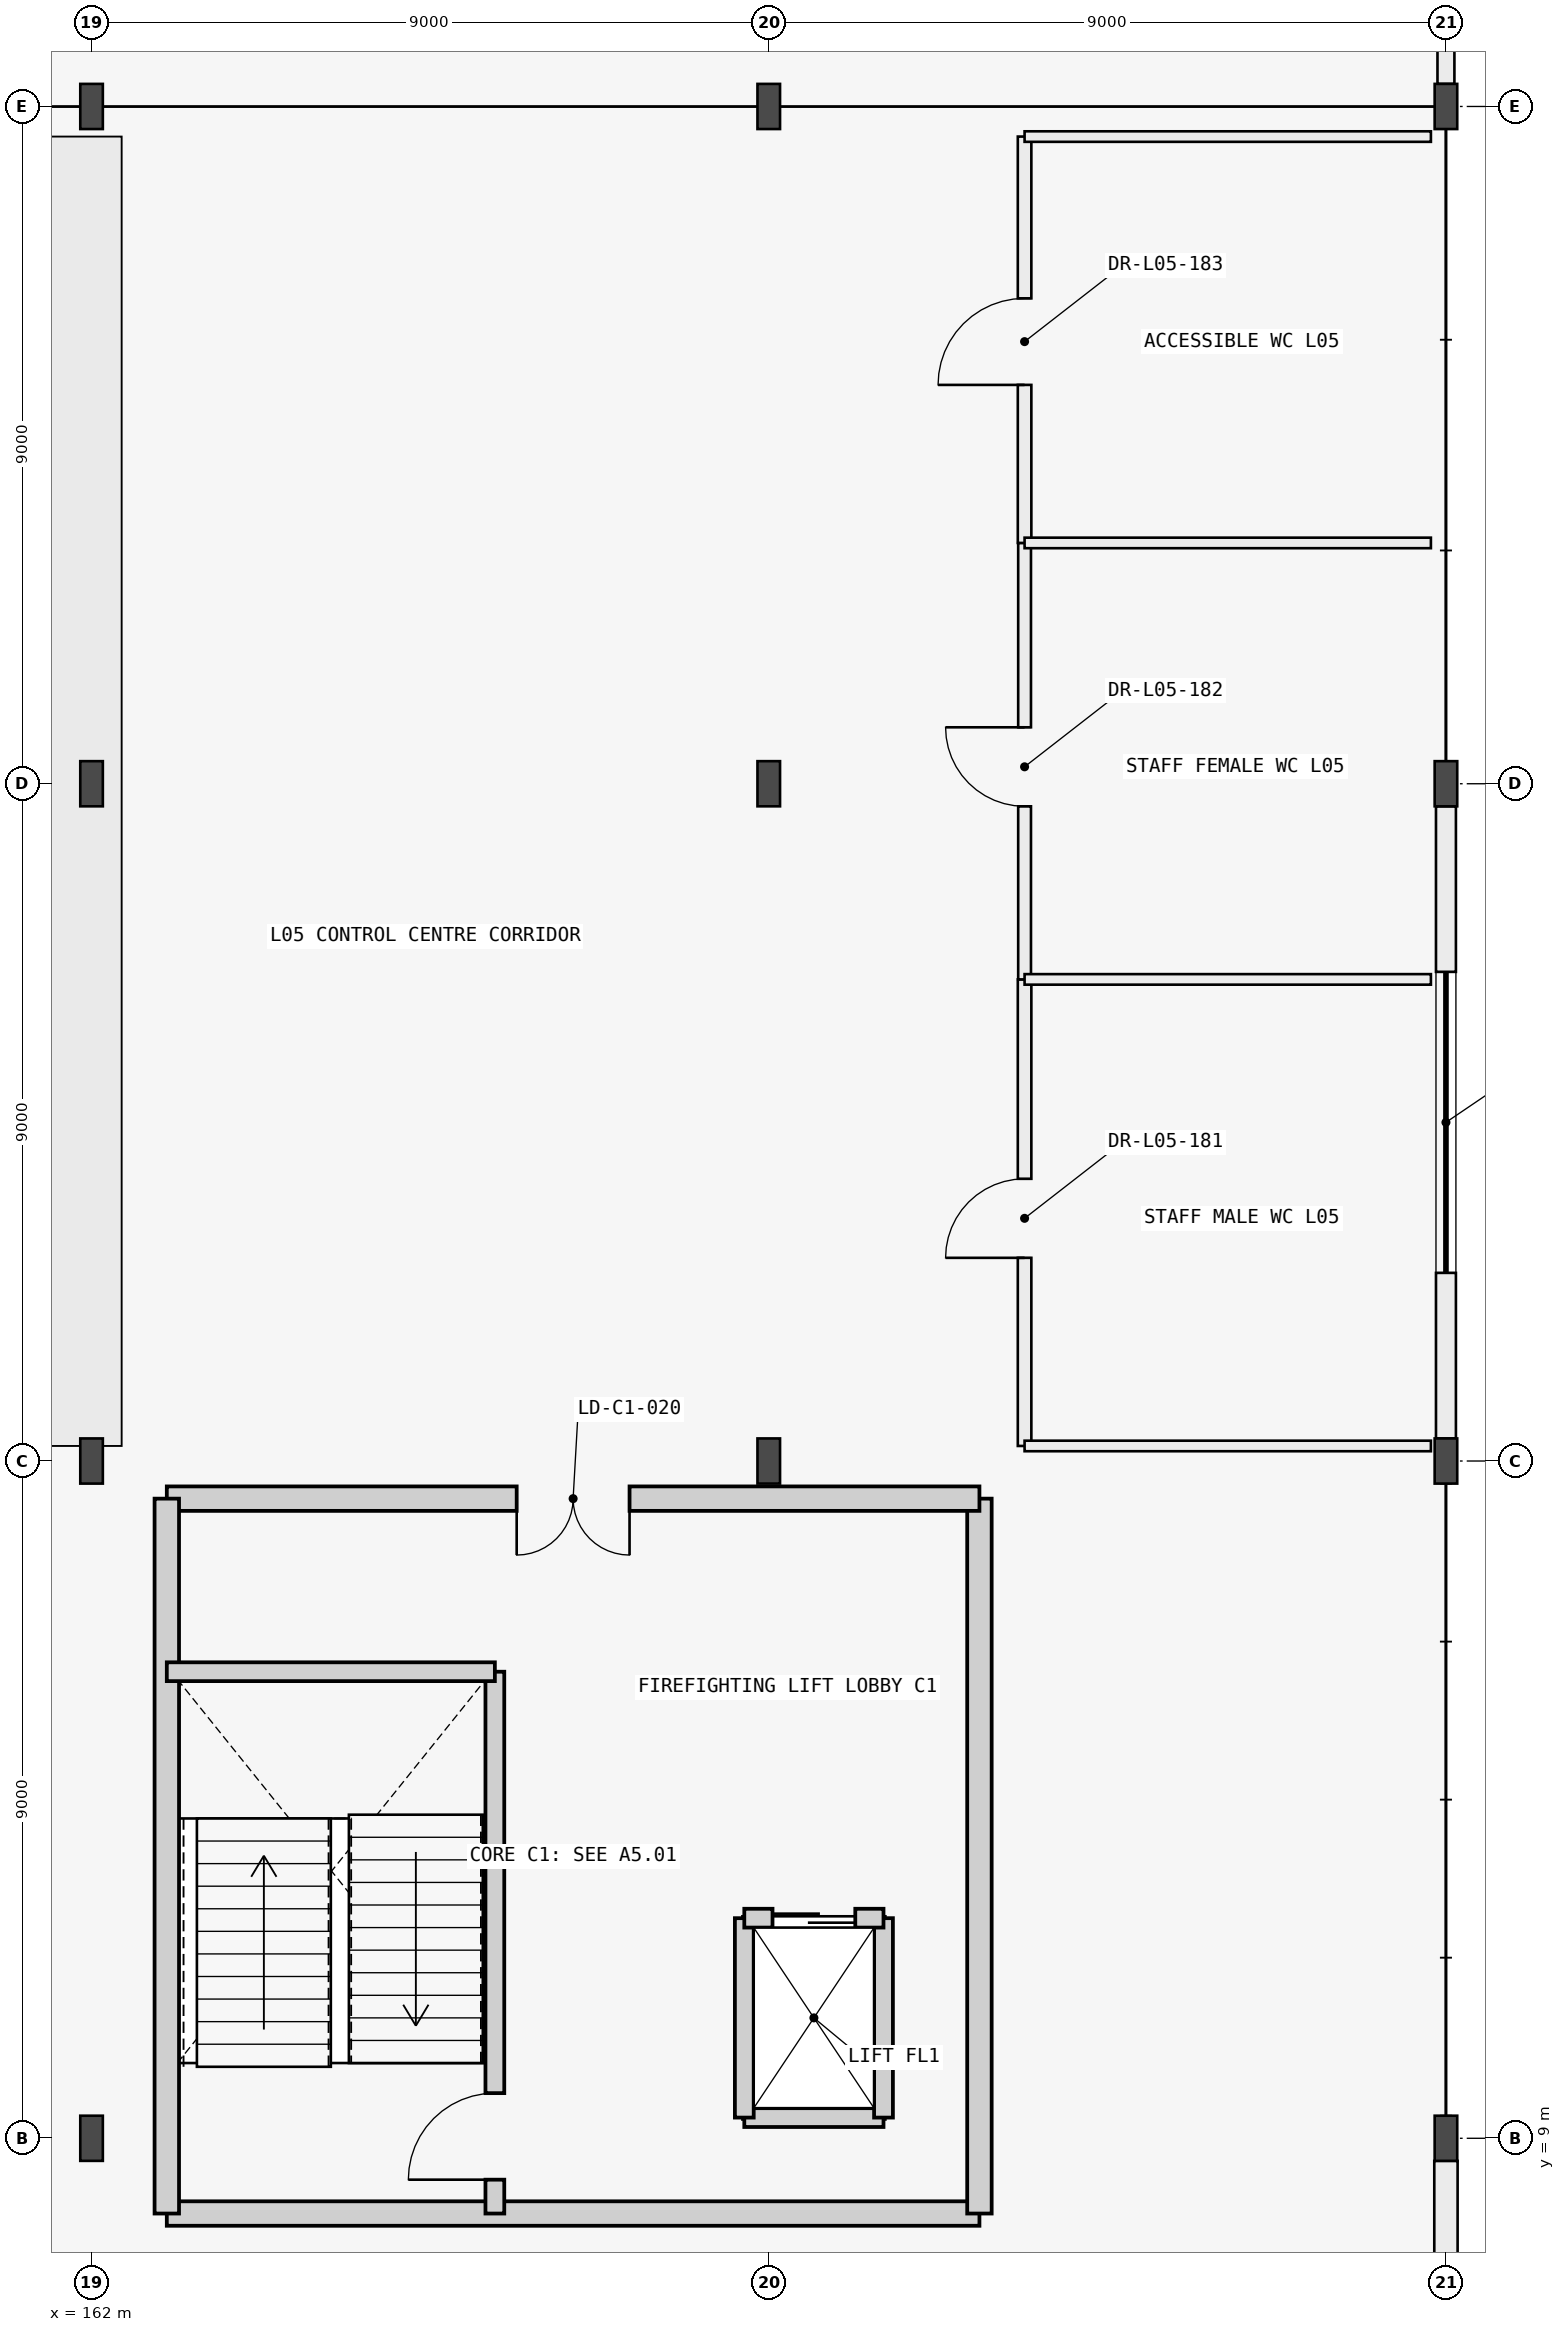
"""IFC4 building model, lengths in metres.
Left out: names, types, materials, properties, quantities, classifications, styles, units other than length and angle.
Written with IfcOpenShell. Run it as: python <this file> out.ifc"""

import sys

from ifc_helpers import new_model, si_unit, direction, frame, frame_2d, origin, origin_2d, place, context, subcontext, project, spatial, rectangle, i_section, extrude, element, fill, save


model = new_model("IFC4")
c1 = context("Model", 3, precision=1e-05, world=origin(), true_north=direction((0.0, 1.0)))
c2 = subcontext(c1, "Body", "Model", "MODEL_VIEW")
j1 = project(units=[si_unit("LENGTHUNIT", "METRE"), si_unit("PLANEANGLEUNIT", "RADIAN")], contexts=[c1])
p1 = place(None, origin())
s1 = spatial("IfcSite", under=j1, at=p1, CompositionType="ELEMENT")
p2 = place(p1, origin())
s2 = spatial("IfcBuilding", under=s1, at=p2, CompositionType="ELEMENT")
p3 = place(p2, frame((0.0, 0.0, 21.0)))
s3 = spatial("IfcBuildingStorey", under=s2, at=p3, CompositionType="ELEMENT", Elevation=21.0)
for number, where, z_axis, x_axis in (
    (1, (162.0, 9.0, 0.0), (0.0, 0.0, 1.0), (1.0, 0.0, 0.0)),
    (2, (180.0, 9.0, 0.0), (0.0, 0.0, 1.0), (1.0, 0.0, 0.0)),
    (3, (162.0, 18.0, 0.0), (0.0, 0.0, 1.0), (1.0, 0.0, 0.0)),
    (4, (171.0, 18.0, 0.0), (0.0, 0.0, 1.0), (1.0, 0.0, 0.0)),
    (5, (180.0, 18.0, 0.0), (0.0, 0.0, 1.0), (1.0, 0.0, 0.0)),
    (6, (162.0, 27.0, 0.0), (0.0, 0.0, 1.0), (1.0, 0.0, 0.0)),
    (7, (171.0, 27.0, 0.0), (0.0, 0.0, 1.0), (1.0, 0.0, 0.0)),
    (8, (180.0, 27.0, 0.0), (0.0, 0.0, 1.0), (1.0, 0.0, 0.0)),
    (9, (162.0, 36.0, 0.0), (0.0, 0.0, 1.0), (1.0, 0.0, 0.0)),
    (10, (171.0, 36.0, 0.0), (0.0, 0.0, 1.0), (1.0, 0.0, 0.0)),
    (11, (180.0, 36.0, 0.0), (0.0, 0.0, 1.0), (1.0, 0.0, 0.0)),
):
    element("IfcColumn", number, at=place(p3, frame(where, z_axis=z_axis, x_axis=x_axis)), inside=s3, PredefinedType="COLUMN", context=c2, shape_type="SweptSolid", body=[
        extrude(i_section(OverallWidth=0.3, OverallDepth=0.6, WebThickness=0.015, FlangeThickness=0.03, FilletRadius=0.027, at=origin_2d()), origin(), (0.0, 0.0, 1.0), 4.2),
    ])
p4 = place(p3, frame((180.0, 0.3, 0.0), z_axis=(0.0, 0.0, 1.0), x_axis=(0.0, 1.0, 0.0)))
e12 = element("IfcWall", 12, at=p4, inside=s3, PredefinedType="STANDARD", context=c2, shape_type="SweptSolid", body=[
    extrude(rectangle(XDim=8.4, YDim=0.31, at=frame_2d((4.2, 0.0))), origin(), (0.0, 0.0, 1.0), 3.635),
])
p5 = place(p4, frame((2.4, 0.0, 0.95)))
e13 = element("IfcOpeningElement", 13, at=p5, cuts=e12, PredefinedType="OPENING", context=c2, shape_type="SweptSolid", body=[
    extrude(rectangle(XDim=3.6, YDim=1.65, at=frame_2d((1.8, 0.825))), frame((0.0, 0.165, 0.0), z_axis=(0.0, -1.0, 0.0), x_axis=(1.0, 0.0, 0.0)), (0.0, 0.0, 1.0), 0.33),
])
p6 = place(p3, frame((180.0, 18.3, 0.0), z_axis=(0.0, 0.0, 1.0), x_axis=(0.0, 1.0, 0.0)))
e14 = element("IfcWall", 14, at=p6, inside=s3, PredefinedType="STANDARD", context=c2, shape_type="SweptSolid", body=[
    extrude(rectangle(XDim=8.4, YDim=0.265, at=frame_2d((4.2, 0.0))), origin(), (0.0, 0.0, 1.0), 3.635),
])
p7 = place(p6, frame((2.2, 0.0, 0.95)))
e15 = element("IfcOpeningElement", 15, at=p7, cuts=e14, PredefinedType="OPENING", context=c2, shape_type="SweptSolid", body=[
    extrude(rectangle(XDim=4.0, YDim=1.5, at=frame_2d((2.0, 0.75))), frame((0.0, 0.143, 0.0), z_axis=(0.0, -1.0, 0.0), x_axis=(1.0, 0.0, 0.0)), (0.0, 0.0, 1.0), 0.285),
])
p8 = place(p3, frame((180.0, 36.3, 0.0), z_axis=(0.0, 0.0, 1.0), x_axis=(0.0, 1.0, 0.0)))
e16 = element("IfcWall", 16, at=p8, inside=s3, PredefinedType="STANDARD", context=c2, shape_type="SweptSolid", body=[
    extrude(rectangle(XDim=8.4, YDim=0.225, at=frame_2d((4.2, 0.0))), origin(), (0.0, 0.0, 1.0), 3.635),
])
p9 = place(p8, frame((3.35, 0.0, 0.95)))
e17 = element("IfcOpeningElement", 17, at=p9, cuts=e16, PredefinedType="OPENING", context=c2, shape_type="SweptSolid", body=[
    extrude(rectangle(XDim=1.7, YDim=2.1, at=frame_2d((0.85, 1.05))), frame((0.0, 0.123, 0.0), z_axis=(0.0, -1.0, 0.0), x_axis=(1.0, 0.0, 0.0)), (0.0, 0.0, 1.0), 0.245),
])
p10 = place(p3, frame((163.0, 8.0, 0.0), z_axis=(0.0, 0.0, 1.0), x_axis=(1.0, 0.0, 0.0)))
e18 = element("IfcWall", 18, at=p10, inside=s3, PredefinedType="SHEAR", context=c2, shape_type="SweptSolid", body=[
    extrude(rectangle(XDim=10.8, YDim=0.325, at=frame_2d((5.4, 0.0))), origin(), (0.0, 0.0, 1.0), 3.96),
])
p11 = place(p3, frame((173.8, 8.0, 0.0), z_axis=(0.0, 0.0, 1.0), x_axis=(0.0, 1.0, 0.0)))
e19 = element("IfcWall", 19, at=p11, inside=s3, PredefinedType="SHEAR", context=c2, shape_type="SweptSolid", body=[
    extrude(rectangle(XDim=9.5, YDim=0.325, at=frame_2d((4.75, 0.0))), origin(), (0.0, 0.0, 1.0), 3.96),
])
p12 = place(p3, frame((173.8, 17.5, 0.0), z_axis=(0.0, 0.0, 1.0), x_axis=(-1.0, 0.0, 0.0)))
e20 = element("IfcWall", 20, at=p12, inside=s3, PredefinedType="SHEAR", context=c2, shape_type="SweptSolid", body=[
    extrude(rectangle(XDim=10.8, YDim=0.325, at=frame_2d((5.4, 0.0))), origin(), (0.0, 0.0, 1.0), 3.96),
])
p13 = place(p12, frame((4.65, 0.0, 0.0)))
e21 = element("IfcOpeningElement", 21, at=p13, cuts=e20, PredefinedType="OPENING", context=c2, shape_type="SweptSolid", body=[
    extrude(rectangle(XDim=1.5, YDim=2.2, at=frame_2d((0.75, 1.1))), frame((0.0, 0.172, 0.0), z_axis=(0.0, -1.0, 0.0), x_axis=(1.0, 0.0, 0.0)), (0.0, 0.0, 1.0), 0.345),
])
p14 = place(p3, frame((163.0, 17.5, 0.0), z_axis=(0.0, 0.0, 1.0), x_axis=(0.0, -1.0, 0.0)))
e22 = element("IfcWall", 22, at=p14, inside=s3, PredefinedType="SHEAR", context=c2, shape_type="SweptSolid", body=[
    extrude(rectangle(XDim=9.5, YDim=0.325, at=frame_2d((4.75, 0.0))), origin(), (0.0, 0.0, 1.0), 3.96),
])
p15 = place(p3, frame((167.36, 8.0, 0.0), z_axis=(0.0, 0.0, 1.0), x_axis=(0.0, 1.0, 0.0)))
e23 = element("IfcWall", 23, at=p15, inside=s3, PredefinedType="SHEAR", context=c2, shape_type="SweptSolid", body=[
    extrude(rectangle(XDim=7.2, YDim=0.25, at=frame_2d((3.6, 0.0))), origin(), (0.0, 0.0, 1.0), 3.96),
])
p16 = place(p15, frame((0.45, 0.0, 0.0)))
e24 = element("IfcOpeningElement", 24, at=p16, cuts=e23, PredefinedType="OPENING", context=c2, shape_type="SweptSolid", body=[
    extrude(rectangle(XDim=1.15, YDim=2.15, at=frame_2d((0.575, 1.075))), frame((0.0, 0.135, 0.0), z_axis=(0.0, -1.0, 0.0), x_axis=(1.0, 0.0, 0.0)), (0.0, 0.0, 1.0), 0.27),
])
p17 = place(p3, frame((163.0, 15.2, 0.0), z_axis=(0.0, 0.0, 1.0), x_axis=(1.0, 0.0, 0.0)))
e25 = element("IfcWall", 25, at=p17, inside=s3, PredefinedType="SHEAR", context=c2, shape_type="SweptSolid", body=[
    extrude(rectangle(XDim=4.36, YDim=0.25, at=frame_2d((2.18, 0.0))), origin(), (0.0, 0.0, 1.0), 3.96),
])
p18 = place(p3, frame((170.675, 9.275, 0.0), z_axis=(0.0, 0.0, 1.0), x_axis=(1.0, 0.0, 0.0)))
e26 = element("IfcWall", 26, at=p18, inside=s3, PredefinedType="SHEAR", context=c2, shape_type="SweptSolid", body=[
    extrude(rectangle(XDim=1.85, YDim=0.25, at=frame_2d((0.925, 0.0))), origin(), (0.0, 0.0, 1.0), 3.96),
])
for number, where, z_axis, x_axis in (
    (27, (170.675, 9.275, 0.0), (0.0, 0.0, 1.0), (0.0, 1.0, 0.0)),
    (28, (172.525, 9.275, 0.0), (0.0, 0.0, 1.0), (0.0, 1.0, 0.0)),
):
    element("IfcWall", number, at=place(p3, frame(where, z_axis=z_axis, x_axis=x_axis)), inside=s3, PredefinedType="SHEAR", context=c2, shape_type="SweptSolid", body=[
        extrude(rectangle(XDim=2.65, YDim=0.25, at=frame_2d((1.325, 0.0))), origin(), (0.0, 0.0, 1.0), 3.96),
    ])
p19 = place(p3, frame((170.675, 11.925, 0.0), z_axis=(0.0, 0.0, 1.0), x_axis=(1.0, 0.0, 0.0)))
e29 = element("IfcWall", 29, at=p19, inside=s3, PredefinedType="SHEAR", context=c2, shape_type="SweptSolid", body=[
    extrude(rectangle(XDim=1.85, YDim=0.25, at=frame_2d((0.925, 0.0))), origin(), (0.0, 0.0, 1.0), 3.96),
])
p20 = place(p19, frame((0.375, 0.0, 0.0)))
e30 = element("IfcOpeningElement", 30, at=p20, cuts=e29, PredefinedType="OPENING", context=c2, shape_type="SweptSolid", body=[
    extrude(rectangle(XDim=1.1, YDim=2.15, at=frame_2d((0.55, 1.075))), frame((0.0, 0.135, 0.0), z_axis=(0.0, -1.0, 0.0), x_axis=(1.0, 0.0, 0.0)), (0.0, 0.0, 1.0), 0.27),
])
p21 = place(p3, frame((174.4, 18.2, 0.0), z_axis=(0.0, 0.0, 1.0), x_axis=(0.0, 1.0, 0.0)))
e31 = element("IfcWall", 31, at=p21, inside=s3, PredefinedType="PARTITIONING", context=c2, shape_type="SweptSolid", body=[
    extrude(rectangle(XDim=6.2, YDim=0.18, at=frame_2d((3.1, 0.0))), origin(), (0.0, 0.0, 1.0), 3.635),
])
p22 = place(p21, frame((2.5, 0.0, 0.0)))
e32 = element("IfcOpeningElement", 32, at=p22, cuts=e31, PredefinedType="OPENING", context=c2, shape_type="SweptSolid", body=[
    extrude(rectangle(XDim=1.05, YDim=2.1, at=frame_2d((0.525, 1.05))), frame((0.0, 0.1, 0.0), z_axis=(0.0, -1.0, 0.0), x_axis=(1.0, 0.0, 0.0)), (0.0, 0.0, 1.0), 0.2),
])
p23 = place(p3, frame((174.4, 24.4, 0.0), z_axis=(0.0, 0.0, 1.0), x_axis=(0.0, 1.0, 0.0)))
e33 = element("IfcWall", 33, at=p23, inside=s3, PredefinedType="PARTITIONING", context=c2, shape_type="SweptSolid", body=[
    extrude(rectangle(XDim=5.8, YDim=0.17, at=frame_2d((2.9, 0.0))), origin(), (0.0, 0.0, 1.0), 3.635),
])
p24 = place(p23, frame((2.3, 0.0, 0.0)))
e34 = element("IfcOpeningElement", 34, at=p24, cuts=e33, PredefinedType="OPENING", context=c2, shape_type="SweptSolid", body=[
    extrude(rectangle(XDim=1.05, YDim=2.1, at=frame_2d((0.525, 1.05))), frame((0.0, 0.095, 0.0), z_axis=(0.0, -1.0, 0.0), x_axis=(1.0, 0.0, 0.0)), (0.0, 0.0, 1.0), 0.19),
])
p25 = place(p3, frame((174.4, 30.2, 0.0), z_axis=(0.0, 0.0, 1.0), x_axis=(0.0, 1.0, 0.0)))
e35 = element("IfcWall", 35, at=p25, inside=s3, PredefinedType="PARTITIONING", context=c2, shape_type="SweptSolid", body=[
    extrude(rectangle(XDim=5.4, YDim=0.18, at=frame_2d((2.7, 0.0))), origin(), (0.0, 0.0, 1.0), 3.635),
])
p26 = place(p25, frame((2.1, 0.0, 0.0)))
e36 = element("IfcOpeningElement", 36, at=p26, cuts=e35, PredefinedType="OPENING", context=c2, shape_type="SweptSolid", body=[
    extrude(rectangle(XDim=1.15, YDim=2.15, at=frame_2d((0.575, 1.075))), frame((0.0, 0.1, 0.0), z_axis=(0.0, -1.0, 0.0), x_axis=(1.0, 0.0, 0.0)), (0.0, 0.0, 1.0), 0.2),
])
p27 = place(p3, frame((174.4, 18.2, 0.0), z_axis=(0.0, 0.0, 1.0), x_axis=(1.0, 0.0, 0.0)))
e37 = element("IfcWall", 37, at=p27, inside=s3, PredefinedType="PARTITIONING", context=c2, shape_type="SweptSolid", body=[
    extrude(rectangle(XDim=5.4, YDim=0.14, at=frame_2d((2.7, 0.0))), origin(), (0.0, 0.0, 1.0), 3.435),
])
for number, where, z_axis, x_axis in (
    (38, (174.4, 24.4, 0.0), (0.0, 0.0, 1.0), (1.0, 0.0, 0.0)),
    (39, (174.4, 30.2, 0.0), (0.0, 0.0, 1.0), (1.0, 0.0, 0.0)),
):
    element("IfcWall", number, at=place(p3, frame(where, z_axis=z_axis, x_axis=x_axis)), inside=s3, PredefinedType="PARTITIONING", context=c2, shape_type="SweptSolid", body=[
        extrude(rectangle(XDim=5.4, YDim=0.14, at=frame_2d((2.7, 0.0))), origin(), (0.0, 0.0, 1.0), 3.96),
    ])
p28 = place(p3, frame((174.4, 35.6, 0.0), z_axis=(0.0, 0.0, 1.0), x_axis=(1.0, 0.0, 0.0)))
e40 = element("IfcWall", 40, at=p28, inside=s3, PredefinedType="PARTITIONING", context=c2, shape_type="SweptSolid", body=[
    extrude(rectangle(XDim=5.4, YDim=0.14, at=frame_2d((2.7, 0.0))), origin(), (0.0, 0.0, 1.0), 3.435),
])
p29 = place(p7, origin())
e41 = element("IfcWindow", 41, at=p29, inside=s3, PartitioningType="SINGLE_PANEL", PredefinedType="WINDOW", context=c2, shape_type="SweptSolid", body=[
    extrude(rectangle(XDim=4.0, YDim=1.5, at=frame_2d((2.0, 0.75))), frame((0.0, 0.03, 0.0), z_axis=(0.0, -1.0, 0.0), x_axis=(1.0, 0.0, 0.0)), (0.0, 0.0, 1.0), 0.06),
])
fill(e15, e41)
p30 = place(p16, origin())
e42 = element("IfcDoor", 42, at=p30, inside=s3, OperationType="SINGLE_SWING_LEFT", PredefinedType="DOOR", context=c2, shape_type="SweptSolid", body=[
    extrude(rectangle(XDim=1.15, YDim=2.15, at=frame_2d((0.575, 1.075))), frame((0.0, 0.025, 0.0), z_axis=(0.0, -1.0, 0.0), x_axis=(1.0, 0.0, 0.0)), (0.0, 0.0, 1.0), 0.05),
])
fill(e24, e42)
p31 = place(p13, origin())
e43 = element("IfcDoor", 43, at=p31, inside=s3, OperationType="DOUBLE_DOOR_SINGLE_SWING", PredefinedType="DOOR", context=c2, shape_type="SweptSolid", body=[
    extrude(rectangle(XDim=1.5, YDim=2.2, at=frame_2d((0.75, 1.1))), frame((0.0, 0.025, 0.0), z_axis=(0.0, -1.0, 0.0), x_axis=(1.0, 0.0, 0.0)), (0.0, 0.0, 1.0), 0.05),
])
fill(e21, e43)
p32 = place(p20, origin())
e44 = element("IfcDoor", 44, at=p32, inside=s3, OperationType="DOUBLE_DOOR_SLIDING", PredefinedType="USERDEFINED", context=c2, shape_type="SweptSolid", body=[
    extrude(rectangle(XDim=1.1, YDim=2.15, at=frame_2d((0.55, 1.075))), frame((0.0, 0.025, 0.0), z_axis=(0.0, -1.0, 0.0), x_axis=(1.0, 0.0, 0.0)), (0.0, 0.0, 1.0), 0.05),
])
fill(e30, e44)
p33 = place(p22, origin())
e45 = element("IfcDoor", 45, at=p33, inside=s3, OperationType="SINGLE_SWING_LEFT", PredefinedType="DOOR", context=c2, shape_type="SweptSolid", body=[
    extrude(rectangle(XDim=1.05, YDim=2.1, at=frame_2d((0.525, 1.05))), frame((0.0, 0.025, 0.0), z_axis=(0.0, -1.0, 0.0), x_axis=(1.0, 0.0, 0.0)), (0.0, 0.0, 1.0), 0.05),
])
fill(e32, e45)
p34 = place(p24, origin())
e46 = element("IfcDoor", 46, at=p34, inside=s3, OperationType="SINGLE_SWING_RIGHT", PredefinedType="DOOR", context=c2, shape_type="SweptSolid", body=[
    extrude(rectangle(XDim=1.05, YDim=2.1, at=frame_2d((0.525, 1.05))), frame((0.0, 0.025, 0.0), z_axis=(0.0, -1.0, 0.0), x_axis=(1.0, 0.0, 0.0)), (0.0, 0.0, 1.0), 0.05),
])
fill(e34, e46)
p35 = place(p26, origin())
e47 = element("IfcDoor", 47, at=p35, inside=s3, OperationType="SINGLE_SWING_LEFT", PredefinedType="DOOR", context=c2, shape_type="SweptSolid", body=[
    extrude(rectangle(XDim=1.15, YDim=2.15, at=frame_2d((0.575, 1.075))), frame((0.0, 0.025, 0.0), z_axis=(0.0, -1.0, 0.0), x_axis=(1.0, 0.0, 0.0)), (0.0, 0.0, 1.0), 0.05),
])
fill(e36, e47)
save(model, sys.argv[1])
